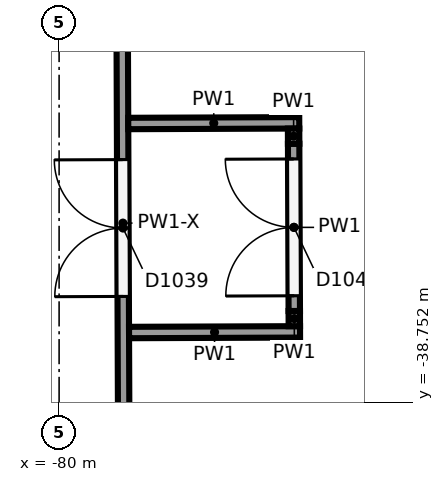
"""IFC4 building model, lengths in metres.
Left out: names, types, materials, properties, quantities, classifications, styles, units other than length and angle.
Written with IfcOpenShell. Run it as: python <this file> out.ifc"""

import sys

from ifc_helpers import new_model, si_unit, direction, frame, frame_2d, origin, place, context, subcontext, project, spatial, rectangle, extrude, element, fill, save


model = new_model("IFC4")
c1 = context("Model", 3, precision=1e-05, world=origin(), true_north=direction((0.0, 1.0)))
c2 = subcontext(c1, "Body", "Model", "MODEL_VIEW")
j1 = project(units=[si_unit("LENGTHUNIT", "METRE"), si_unit("PLANEANGLEUNIT", "RADIAN")], contexts=[c1])
p1 = place(None, origin())
s1 = spatial("IfcSite", under=j1, at=p1, CompositionType="ELEMENT")
p2 = place(p1, origin())
s2 = spatial("IfcBuilding", under=s1, at=p2, CompositionType="ELEMENT")
p3 = place(p2, frame((0.0, 0.0, 12.0)))
s3 = spatial("IfcBuildingStorey", under=s2, at=p3, CompositionType="ELEMENT", Elevation=12.0)
p4 = place(p3, frame((-79.14, -41.81, 0.0), z_axis=(0.0, 0.0, 1.0), x_axis=(-0.003787424647, 0.999992827682, 0.0)))
e1 = element("IfcWall", 1, at=p4, inside=s3, PredefinedType="PARTITIONING", context=c2, shape_type="SweptSolid", body=[
    extrude(rectangle(XDim=10.829, YDim=0.15, at=frame_2d((5.415, 0.0))), origin(), (0.0, 0.0, 1.0), 4.048),
])
p5 = place(p4, frame((4.45, 0.0, 0.0)))
e2 = element("IfcOpeningElement", 2, at=p5, cuts=e1, PredefinedType="OPENING", context=c2, shape_type="SweptSolid", body=[
    extrude(rectangle(XDim=1.8, YDim=2.1, at=frame_2d((0.9, 1.05))), frame((0.0, 0.085, 0.0), z_axis=(0.0, -1.0, 0.0), x_axis=(1.0, 0.0, 0.0)), (0.0, 0.0, 1.0), 0.17),
])
for number, where, z_axis, x_axis in (
    (3, (-79.08, -37.835, 0.0), (0.0, 0.0, 1.0), (1.0, 0.004, 0.0)),
    (4, (-79.09, -35.085, 0.0), (0.0, 0.0, 1.0), (1.0, 0.004, 0.0)),
):
    element("IfcWall", number, at=place(p3, frame(where, z_axis=z_axis, x_axis=x_axis)), inside=s3, PredefinedType="PARTITIONING", context=c2, shape_type="SweptSolid", body=[
        extrude(rectangle(XDim=2.25, YDim=0.15, at=frame_2d((1.125, 0.0))), origin(), (0.0, 0.0, 1.0), 5.65),
    ])
p6 = place(p3, frame((-76.905, -37.751, 0.0), z_axis=(0.0, 0.0, 1.0), x_axis=(-0.004883946635, 0.999988073462, 0.0)))
e5 = element("IfcWall", 5, at=p6, inside=s3, PredefinedType="PARTITIONING", context=c2, shape_type="SweptSolid", body=[
    extrude(rectangle(XDim=0.2, YDim=0.15, at=frame_2d((0.1, 0.0))), origin(), (0.0, 0.0, 1.0), 5.65),
])
p7 = place(p3, frame((-76.906, -37.552, 0.0), z_axis=(0.0, 0.0, 1.0), x_axis=(-0.003773139272, 0.999992881685, 0.0)))
e6 = element("IfcWall", 6, at=p7, inside=s3, PredefinedType="PARTITIONING", context=c2, shape_type="SweptSolid", body=[
    extrude(rectangle(XDim=2.2, YDim=0.15, at=frame_2d((1.1, 0.0))), origin(), (0.0, 0.0, 1.0), 5.65),
])
p8 = place(p7, frame((0.2, 0.0, 0.0)))
e7 = element("IfcOpeningElement", 7, at=p8, cuts=e6, PredefinedType="OPENING", context=c2, shape_type="SweptSolid", body=[
    extrude(rectangle(XDim=1.8, YDim=2.1, at=frame_2d((0.9, 1.05))), frame((0.0, 0.085, 0.0), z_axis=(0.0, -1.0, 0.0), x_axis=(1.0, 0.0, 0.0)), (0.0, 0.0, 1.0), 0.17),
])
p9 = place(p3, frame((-76.914, -35.352, 0.0), z_axis=(0.0, 0.0, 1.0), x_axis=(-0.003662979089, 0.99999329127, 0.0)))
e8 = element("IfcWall", 8, at=p9, inside=s3, PredefinedType="PARTITIONING", context=c2, shape_type="SweptSolid", body=[
    extrude(rectangle(XDim=0.2, YDim=0.15, at=frame_2d((0.1, 0.0))), origin(), (0.0, 0.0, 1.0), 5.65),
])
p10 = place(p5, origin())
e9 = element("IfcDoor", 9, at=p10, inside=s3, OperationType="DOUBLE_DOOR_SINGLE_SWING", PredefinedType="DOOR", context=c2, shape_type="SweptSolid", body=[
    extrude(rectangle(XDim=1.8, YDim=2.1, at=frame_2d((0.9, 1.05))), frame((0.0, 0.025, 0.0), z_axis=(0.0, -1.0, 0.0), x_axis=(1.0, 0.0, 0.0)), (0.0, 0.0, 1.0), 0.05),
])
fill(e2, e9)
p11 = place(p8, origin())
e10 = element("IfcDoor", 10, at=p11, inside=s3, OperationType="DOUBLE_DOOR_SINGLE_SWING", PredefinedType="DOOR", context=c2, shape_type="SweptSolid", body=[
    extrude(rectangle(XDim=1.8, YDim=2.1, at=frame_2d((0.9, 1.05))), frame((0.0, 0.025, 0.0), z_axis=(0.0, -1.0, 0.0), x_axis=(1.0, 0.0, 0.0)), (0.0, 0.0, 1.0), 0.05),
])
fill(e7, e10)
save(model, sys.argv[1])
